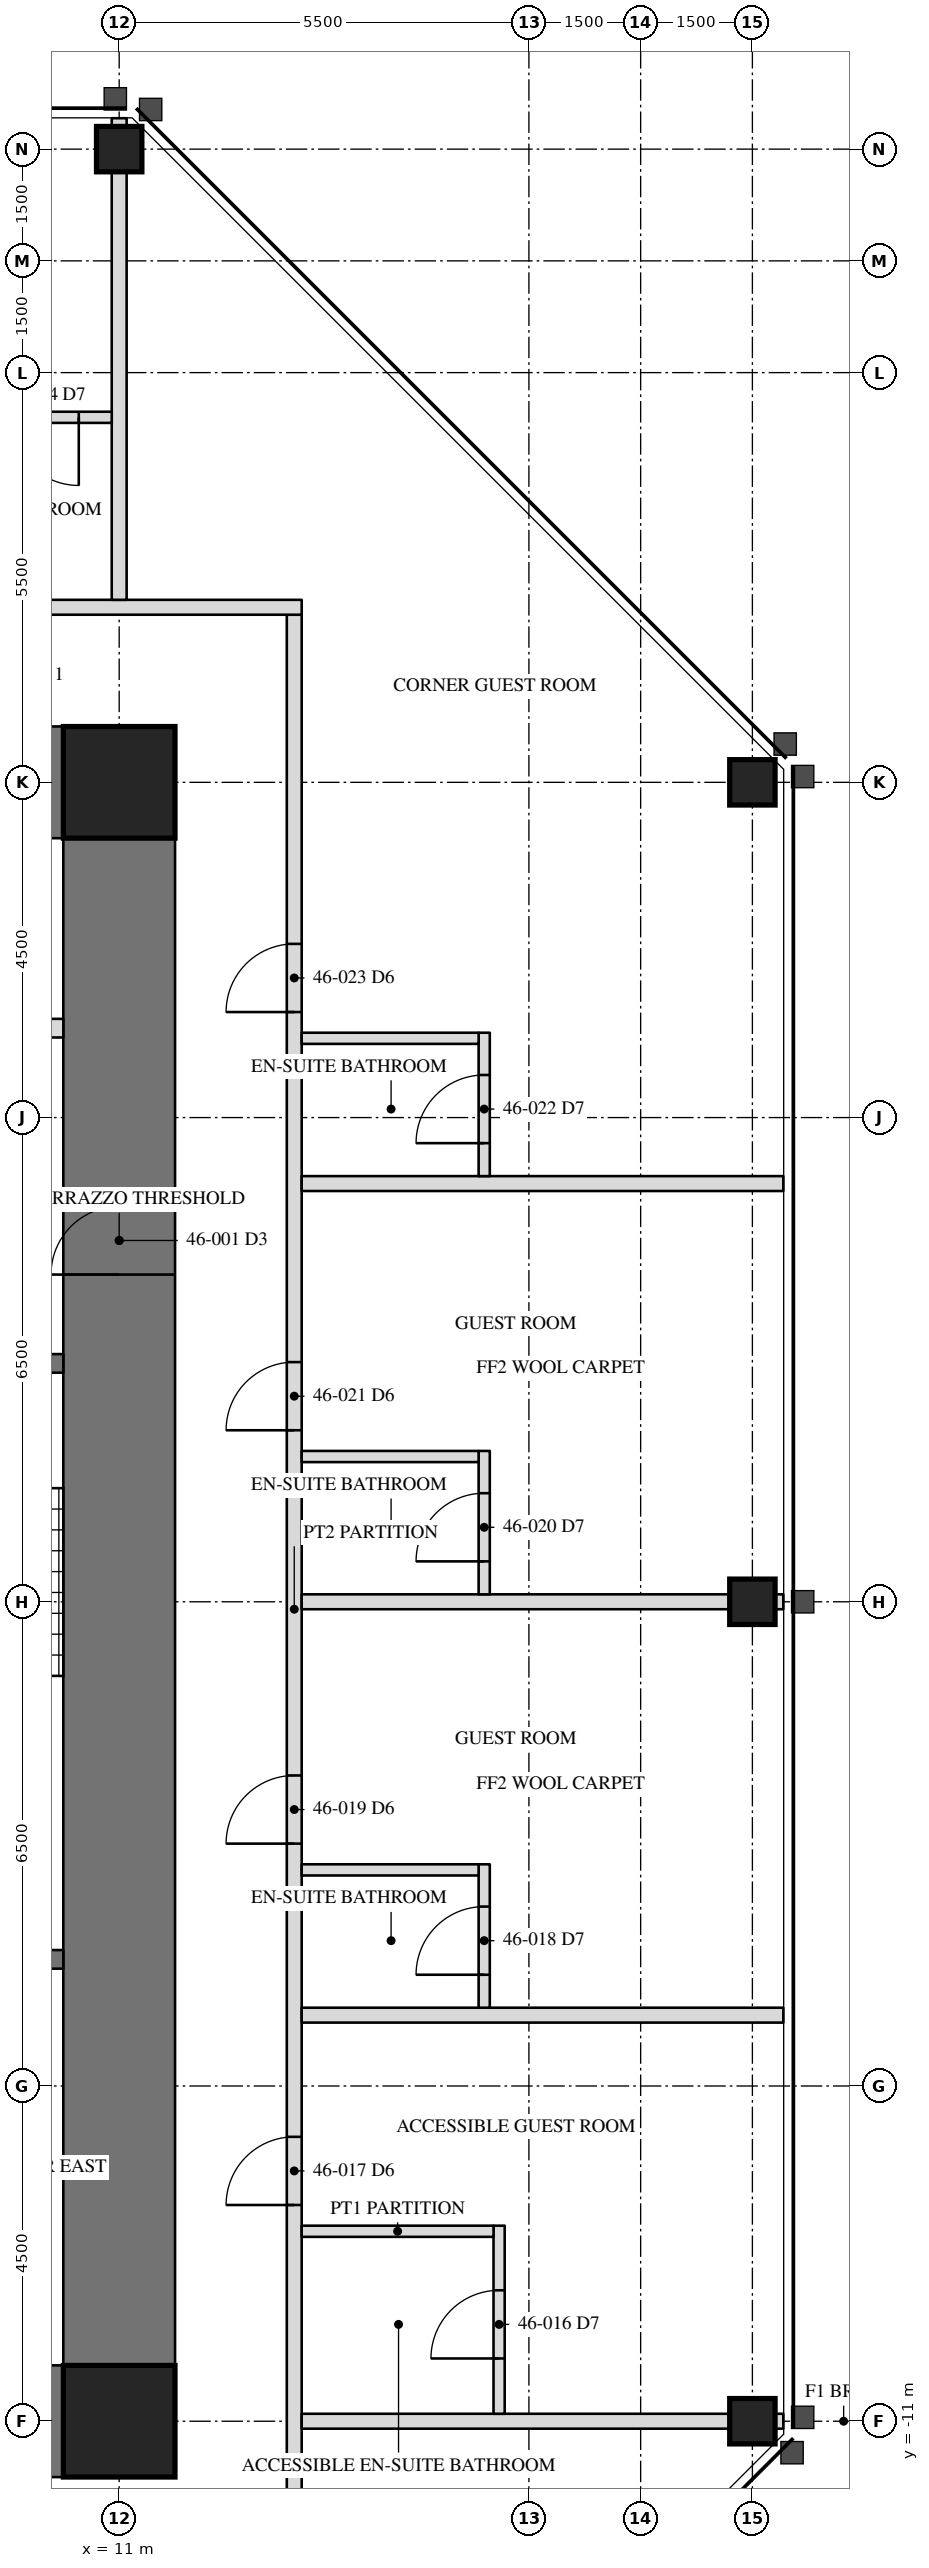
"""IFC4 building model, lengths in metres.
Left out: names, types, materials, properties, quantities, classifications, styles, units other than length and angle.
Written with IfcOpenShell. Run it as: python <this file> out.ifc"""

import sys

from ifc_helpers import new_model, si_unit, direction, frame, frame_2d, origin, origin_2d, place, context, subcontext, project, spatial, rectangle, hollow_rectangle, extrude, element, fill, save


model = new_model("IFC4")
c1 = context("Model", 3, precision=1e-05, world=origin(), true_north=direction((0.0, 1.0)))
c2 = subcontext(c1, "Body", "Model", "MODEL_VIEW")
j1 = project(units=[si_unit("LENGTHUNIT", "METRE"), si_unit("PLANEANGLEUNIT", "RADIAN")], contexts=[c1])
p1 = place(None, origin())
s1 = spatial("IfcSite", under=j1, at=p1, CompositionType="ELEMENT")
p2 = place(p1, origin())
s2 = spatial("IfcBuilding", under=s1, at=p2, CompositionType="ELEMENT")
p3 = place(p2, frame((0.0, 0.0, 197.7)))
s3 = spatial("IfcBuildingStorey", under=s2, at=p3, CompositionType="ELEMENT", Elevation=197.7)
for number, where, z_axis, x_axis in (
    (1, (19.5, -11.0, 0.0), (0.0, 0.0, 1.0), (0.0, 1.0, 0.0)),
    (2, (19.5, 0.0, 0.0), (0.0, 0.0, 1.0), (0.0, 1.0, 0.0)),
    (3, (19.5, 11.0, 0.0), (0.0, 0.0, 1.0), (0.0, 1.0, 0.0)),
    (4, (11.0, 19.5, 0.0), (0.0, 0.0, 1.0), (1.0, 0.0, 0.0)),
):
    element("IfcColumn", number, at=place(p3, frame(where, z_axis=z_axis, x_axis=x_axis)), inside=s3, PredefinedType="COLUMN", context=c2, shape_type="SweptSolid", body=[
        extrude(hollow_rectangle(XDim=0.61, YDim=0.61, WallThickness=0.076, at=origin_2d()), origin(), (0.0, 0.0, 1.0), 3.5),
    ])
p4 = place(p3, frame((11.0, -11.0, 0.0), z_axis=(0.0, 0.0, 1.0), x_axis=(0.0, 1.0, 0.0)))
e5 = element("IfcWall", 5, at=p4, inside=s3, PredefinedType="SHEAR", context=c2, shape_type="SweptSolid", body=[
    extrude(rectangle(XDim=22.0, YDim=1.5, at=frame_2d((11.0, 0.0))), origin(), (0.0, 0.0, 1.0), 3.5),
])
p5 = place(p4, frame((15.393, 0.0, 0.0)))
e6 = element("IfcOpeningElement", 6, at=p5, cuts=e5, PredefinedType="OPENING", context=c2, shape_type="SweptSolid", body=[
    extrude(rectangle(XDim=0.915, YDim=2.134, at=frame_2d((0.458, 1.067))), frame((0.0, 0.76, 0.0), z_axis=(0.0, -1.0, 0.0), x_axis=(1.0, 0.0, 0.0)), (0.0, 0.0, 1.0), 1.52),
])
for number, where, z_axis, x_axis in (
    (7, (11.0, 11.0, 0.0), (0.0, 0.0, 1.0), (-1.0, 0.0, 0.0)),
    (8, (6.5, -11.0, 0.0), (0.0, 0.0, 1.0), (1.0, 0.0, 0.0)),
):
    element("IfcWall", number, at=place(p3, frame(where, z_axis=z_axis, x_axis=x_axis)), inside=s3, PredefinedType="SHEAR", context=c2, shape_type="SweptSolid", body=[
        extrude(rectangle(XDim=4.5, YDim=1.5, at=frame_2d((2.25, 0.0))), origin(), (0.0, 0.0, 1.0), 3.5),
    ])
for number, where, z_axis, x_axis in (
    (9, (11.0, 11.0, 0.0), (0.0, 0.0, 1.0), (1.0, 0.0, 0.0)),
    (10, (11.0, -11.0, 0.0), (0.0, 0.0, 1.0), (1.0, 0.0, 0.0)),
):
    element("IfcColumn", number, at=place(p3, frame(where, z_axis=z_axis, x_axis=x_axis)), inside=s3, PredefinedType="COLUMN", context=c2, shape_type="SweptSolid", body=[
        extrude(hollow_rectangle(XDim=1.499, YDim=1.499, WallThickness=0.102, at=origin_2d()), origin(), (0.0, 0.0, 1.0), 3.5),
    ])
p6 = place(p3, frame((6.95, -4.8, 0.0), z_axis=(0.0, 0.0, 1.0), x_axis=(1.0, 0.0, 0.0)))
e11 = element("IfcWall", 11, at=p6, inside=s3, PredefinedType="SOLIDWALL", context=c2, shape_type="SweptSolid", body=[
    extrude(rectangle(XDim=3.3, YDim=0.25, at=frame_2d((1.65, 0.0))), origin(), (0.0, 0.0, 1.0), 3.31),
])
p7 = place(p3, frame((6.95, 3.2, 0.0), z_axis=(0.0, 0.0, 1.0), x_axis=(1.0, 0.0, 0.0)))
e12 = element("IfcWall", 12, at=p7, inside=s3, PredefinedType="SOLIDWALL", context=c2, shape_type="SweptSolid", body=[
    extrude(rectangle(XDim=3.3, YDim=0.25, at=frame_2d((1.65, 0.0))), origin(), (0.0, 0.0, 1.0), 3.31),
])
p8 = place(p7, frame((1.116, 0.0, 0.0)))
e13 = element("IfcOpeningElement", 13, at=p8, cuts=e12, PredefinedType="OPENING", context=c2, shape_type="SweptSolid", body=[
    extrude(rectangle(XDim=1.067, YDim=2.134, at=frame_2d((0.533, 1.067))), frame((0.0, 0.135, 0.0), z_axis=(0.0, -1.0, 0.0), x_axis=(1.0, 0.0, 0.0)), (0.0, 0.0, 1.0), 0.27),
])
p9 = place(p3, frame((6.95, 7.7, 0.0), z_axis=(0.0, 0.0, 1.0), x_axis=(1.0, 0.0, 0.0)))
e14 = element("IfcWall", 14, at=p9, inside=s3, PredefinedType="PARTITIONING", context=c2, shape_type="SweptSolid", body=[
    extrude(rectangle(XDim=3.3, YDim=0.25, at=frame_2d((1.65, 0.0))), origin(), (0.0, 0.0, 1.0), 3.31),
])
p10 = place(p9, frame((0.45, 0.0, 0.0)))
e15 = element("IfcOpeningElement", 15, at=p10, cuts=e14, PredefinedType="OPENING", context=c2, shape_type="SweptSolid", body=[
    extrude(rectangle(XDim=1.219, YDim=2.134, at=frame_2d((0.609, 1.067))), frame((0.0, 0.135, 0.0), z_axis=(0.0, -1.0, 0.0), x_axis=(1.0, 0.0, 0.0)), (0.0, 0.0, 1.0), 0.27),
])
p11 = place(p3, frame((13.35, -13.45, 0.0), z_axis=(0.0, 0.0, 1.0), x_axis=(0.0, 1.0, 0.0)))
e16 = element("IfcWall", 16, at=p11, inside=s3, PredefinedType="PARTITIONING", context=c2, shape_type="SweptSolid", body=[
    extrude(rectangle(XDim=26.7, YDim=0.2, at=frame_2d((13.35, 0.0))), origin(), (0.0, 0.0, 1.0), 3.31),
])
p12 = place(p11, frame((5.353, 0.0, 0.0)))
e17 = element("IfcOpeningElement", 17, at=p12, cuts=e16, PredefinedType="OPENING", context=c2, shape_type="SweptSolid", body=[
    extrude(rectangle(XDim=0.915, YDim=2.134, at=frame_2d((0.458, 1.067))), frame((0.0, 0.11, 0.0), z_axis=(0.0, -1.0, 0.0), x_axis=(1.0, 0.0, 0.0)), (0.0, 0.0, 1.0), 0.22),
])
p13 = place(p11, frame((10.204, 0.0, 0.0)))
e18 = element("IfcOpeningElement", 18, at=p13, cuts=e16, PredefinedType="OPENING", context=c2, shape_type="SweptSolid", body=[
    extrude(rectangle(XDim=0.915, YDim=2.134, at=frame_2d((0.458, 1.067))), frame((0.0, 0.11, 0.0), z_axis=(0.0, -1.0, 0.0), x_axis=(1.0, 0.0, 0.0)), (0.0, 0.0, 1.0), 0.22),
])
p14 = place(p11, frame((15.752, 0.0, 0.0)))
e19 = element("IfcOpeningElement", 19, at=p14, cuts=e16, PredefinedType="OPENING", context=c2, shape_type="SweptSolid", body=[
    extrude(rectangle(XDim=0.915, YDim=2.134, at=frame_2d((0.458, 1.067))), frame((0.0, 0.11, 0.0), z_axis=(0.0, -1.0, 0.0), x_axis=(1.0, 0.0, 0.0)), (0.0, 0.0, 1.0), 0.22),
])
p15 = place(p11, frame((21.366, 0.0, 0.0)))
e20 = element("IfcOpeningElement", 20, at=p15, cuts=e16, PredefinedType="OPENING", context=c2, shape_type="SweptSolid", body=[
    extrude(rectangle(XDim=0.915, YDim=2.134, at=frame_2d((0.458, 1.067))), frame((0.0, 0.11, 0.0), z_axis=(0.0, -1.0, 0.0), x_axis=(1.0, 0.0, 0.0)), (0.0, 0.0, 1.0), 0.22),
])
p16 = place(p3, frame((13.45, 13.35, 0.0), z_axis=(0.0, 0.0, 1.0), x_axis=(-1.0, 0.0, 0.0)))
e21 = element("IfcWall", 21, at=p16, inside=s3, PredefinedType="PARTITIONING", context=c2, shape_type="SweptSolid", body=[
    extrude(rectangle(XDim=26.7, YDim=0.2, at=frame_2d((13.35, 0.0))), origin(), (0.0, 0.0, 1.0), 3.31),
])
p17 = place(p16, frame((4.752, 0.0, 0.0)))
e22 = element("IfcOpeningElement", 22, at=p17, cuts=e21, PredefinedType="OPENING", context=c2, shape_type="SweptSolid", body=[
    extrude(rectangle(XDim=0.915, YDim=2.134, at=frame_2d((0.458, 1.067))), frame((0.0, 0.11, 0.0), z_axis=(0.0, -1.0, 0.0), x_axis=(1.0, 0.0, 0.0)), (0.0, 0.0, 1.0), 0.22),
])
p18 = place(p16, frame((10.204, 0.0, 0.0)))
e23 = element("IfcOpeningElement", 23, at=p18, cuts=e21, PredefinedType="OPENING", context=c2, shape_type="SweptSolid", body=[
    extrude(rectangle(XDim=0.915, YDim=2.134, at=frame_2d((0.458, 1.067))), frame((0.0, 0.11, 0.0), z_axis=(0.0, -1.0, 0.0), x_axis=(1.0, 0.0, 0.0)), (0.0, 0.0, 1.0), 0.22),
])
p19 = place(p16, frame((15.752, 0.0, 0.0)))
e24 = element("IfcOpeningElement", 24, at=p19, cuts=e21, PredefinedType="OPENING", context=c2, shape_type="SweptSolid", body=[
    extrude(rectangle(XDim=0.915, YDim=2.134, at=frame_2d((0.458, 1.067))), frame((0.0, 0.11, 0.0), z_axis=(0.0, -1.0, 0.0), x_axis=(1.0, 0.0, 0.0)), (0.0, 0.0, 1.0), 0.22),
])
p20 = place(p16, frame((21.366, 0.0, 0.0)))
e25 = element("IfcOpeningElement", 25, at=p20, cuts=e21, PredefinedType="OPENING", context=c2, shape_type="SweptSolid", body=[
    extrude(rectangle(XDim=0.915, YDim=2.134, at=frame_2d((0.458, 1.067))), frame((0.0, 0.11, 0.0), z_axis=(0.0, -1.0, 0.0), x_axis=(1.0, 0.0, 0.0)), (0.0, 0.0, 1.0), 0.22),
])
p21 = place(p3, frame((13.45, -11.0, 0.0), z_axis=(0.0, 0.0, 1.0), x_axis=(1.0, 0.0, 0.0)))
e26 = element("IfcWall", 26, at=p21, inside=s3, PredefinedType="PARTITIONING", context=c2, shape_type="SweptSolid", body=[
    extrude(rectangle(XDim=6.465, YDim=0.2, at=frame_2d((3.232, 0.0))), origin(), (0.0, 0.0, 1.0), 2.802),
])
p22 = place(p3, frame((13.45, -5.549, 0.0), z_axis=(0.0, 0.0, 1.0), x_axis=(1.0, 0.0, 0.0)))
e27 = element("IfcWall", 27, at=p22, inside=s3, PredefinedType="PARTITIONING", context=c2, shape_type="SweptSolid", body=[
    extrude(rectangle(XDim=6.465, YDim=0.2, at=frame_2d((3.232, 0.0))), origin(), (0.0, 0.0, 1.0), 3.31),
])
p23 = place(p3, frame((13.45, 0.0, 0.0), z_axis=(0.0, 0.0, 1.0), x_axis=(1.0, 0.0, 0.0)))
e28 = element("IfcWall", 28, at=p23, inside=s3, PredefinedType="PARTITIONING", context=c2, shape_type="SweptSolid", body=[
    extrude(rectangle(XDim=6.465, YDim=0.2, at=frame_2d((3.232, 0.0))), origin(), (0.0, 0.0, 1.0), 2.802),
])
p24 = place(p3, frame((13.45, 5.614, 0.0), z_axis=(0.0, 0.0, 1.0), x_axis=(1.0, 0.0, 0.0)))
e29 = element("IfcWall", 29, at=p24, inside=s3, PredefinedType="PARTITIONING", context=c2, shape_type="SweptSolid", body=[
    extrude(rectangle(XDim=6.465, YDim=0.2, at=frame_2d((3.232, 0.0))), origin(), (0.0, 0.0, 1.0), 3.31),
])
p25 = place(p3, frame((16.1, -10.9, 0.0), z_axis=(0.0, 0.0, 1.0), x_axis=(0.0, 1.0, 0.0)))
e30 = element("IfcWall", 30, at=p25, inside=s3, PredefinedType="PARTITIONING", context=c2, shape_type="SweptSolid", body=[
    extrude(rectangle(XDim=2.525, YDim=0.15, at=frame_2d((1.262, 0.0))), origin(), (0.0, 0.0, 1.0), 3.31),
])
p26 = place(p25, frame((0.742, 0.0, 0.0)))
e31 = element("IfcOpeningElement", 31, at=p26, cuts=e30, PredefinedType="OPENING", context=c2, shape_type="SweptSolid", body=[
    extrude(rectangle(XDim=0.915, YDim=2.032, at=frame_2d((0.458, 1.016))), frame((0.0, 0.085, 0.0), z_axis=(0.0, -1.0, 0.0), x_axis=(1.0, 0.0, 0.0)), (0.0, 0.0, 1.0), 0.17),
])
p27 = place(p3, frame((13.45, -8.45, 0.0), z_axis=(0.0, 0.0, 1.0), x_axis=(1.0, 0.0, 0.0)))
e32 = element("IfcWall", 32, at=p27, inside=s3, PredefinedType="PARTITIONING", context=c2, shape_type="SweptSolid", body=[
    extrude(rectangle(XDim=2.575, YDim=0.15, at=frame_2d((1.288, 0.0))), origin(), (0.0, 0.0, 1.0), 3.31),
])
p28 = place(p3, frame((15.9, -5.449, 0.0), z_axis=(0.0, 0.0, 1.0), x_axis=(0.0, 1.0, 0.0)))
e33 = element("IfcWall", 33, at=p28, inside=s3, PredefinedType="PARTITIONING", context=c2, shape_type="SweptSolid", body=[
    extrude(rectangle(XDim=1.925, YDim=0.15, at=frame_2d((0.962, 0.0))), origin(), (0.0, 0.0, 1.0), 3.31),
])
p29 = place(p28, frame((0.442, 0.0, 0.0)))
e34 = element("IfcOpeningElement", 34, at=p29, cuts=e33, PredefinedType="OPENING", context=c2, shape_type="SweptSolid", body=[
    extrude(rectangle(XDim=0.915, YDim=2.032, at=frame_2d((0.458, 1.016))), frame((0.0, 0.085, 0.0), z_axis=(0.0, -1.0, 0.0), x_axis=(1.0, 0.0, 0.0)), (0.0, 0.0, 1.0), 0.17),
])
p30 = place(p3, frame((13.45, -3.599, 0.0), z_axis=(0.0, 0.0, 1.0), x_axis=(1.0, 0.0, 0.0)))
e35 = element("IfcWall", 35, at=p30, inside=s3, PredefinedType="PARTITIONING", context=c2, shape_type="SweptSolid", body=[
    extrude(rectangle(XDim=2.375, YDim=0.15, at=frame_2d((1.188, 0.0))), origin(), (0.0, 0.0, 1.0), 2.703),
])
p31 = place(p3, frame((15.9, 0.1, 0.0), z_axis=(0.0, 0.0, 1.0), x_axis=(0.0, 1.0, 0.0)))
e36 = element("IfcWall", 36, at=p31, inside=s3, PredefinedType="PARTITIONING", context=c2, shape_type="SweptSolid", body=[
    extrude(rectangle(XDim=1.925, YDim=0.15, at=frame_2d((0.962, 0.0))), origin(), (0.0, 0.0, 1.0), 3.31),
])
p32 = place(p31, frame((0.442, 0.0, 0.0)))
e37 = element("IfcOpeningElement", 37, at=p32, cuts=e36, PredefinedType="OPENING", context=c2, shape_type="SweptSolid", body=[
    extrude(rectangle(XDim=0.915, YDim=2.032, at=frame_2d((0.458, 1.016))), frame((0.0, 0.085, 0.0), z_axis=(0.0, -1.0, 0.0), x_axis=(1.0, 0.0, 0.0)), (0.0, 0.0, 1.0), 0.17),
])
p33 = place(p3, frame((13.45, 1.95, 0.0), z_axis=(0.0, 0.0, 1.0), x_axis=(1.0, 0.0, 0.0)))
e38 = element("IfcWall", 38, at=p33, inside=s3, PredefinedType="PARTITIONING", context=c2, shape_type="SweptSolid", body=[
    extrude(rectangle(XDim=2.375, YDim=0.15, at=frame_2d((1.188, 0.0))), origin(), (0.0, 0.0, 1.0), 3.31),
])
p34 = place(p3, frame((15.9, 5.714, 0.0), z_axis=(0.0, 0.0, 1.0), x_axis=(0.0, 1.0, 0.0)))
e39 = element("IfcWall", 39, at=p34, inside=s3, PredefinedType="PARTITIONING", context=c2, shape_type="SweptSolid", body=[
    extrude(rectangle(XDim=1.925, YDim=0.15, at=frame_2d((0.962, 0.0))), origin(), (0.0, 0.0, 1.0), 3.31),
])
p35 = place(p34, frame((0.442, 0.0, 0.0)))
e40 = element("IfcOpeningElement", 40, at=p35, cuts=e39, PredefinedType="OPENING", context=c2, shape_type="SweptSolid", body=[
    extrude(rectangle(XDim=0.915, YDim=2.032, at=frame_2d((0.458, 1.016))), frame((0.0, 0.085, 0.0), z_axis=(0.0, -1.0, 0.0), x_axis=(1.0, 0.0, 0.0)), (0.0, 0.0, 1.0), 0.17),
])
p36 = place(p3, frame((13.45, 7.564, 0.0), z_axis=(0.0, 0.0, 1.0), x_axis=(1.0, 0.0, 0.0)))
e41 = element("IfcWall", 41, at=p36, inside=s3, PredefinedType="PARTITIONING", context=c2, shape_type="SweptSolid", body=[
    extrude(rectangle(XDim=2.375, YDim=0.15, at=frame_2d((1.188, 0.0))), origin(), (0.0, 0.0, 1.0), 3.31),
])
p37 = place(p3, frame((11.0, 13.45, 0.0), z_axis=(0.0, 0.0, 1.0), x_axis=(0.0, 1.0, 0.0)))
e42 = element("IfcWall", 42, at=p37, inside=s3, PredefinedType="PARTITIONING", context=c2, shape_type="SweptSolid", body=[
    extrude(rectangle(XDim=6.465, YDim=0.2, at=frame_2d((3.232, 0.0))), origin(), (0.0, 0.0, 1.0), 2.802),
])
p38 = place(p3, frame((10.9, 15.9, 0.0), z_axis=(0.0, 0.0, 1.0), x_axis=(-1.0, 0.0, 0.0)))
e43 = element("IfcWall", 43, at=p38, inside=s3, PredefinedType="PARTITIONING", context=c2, shape_type="SweptSolid", body=[
    extrude(rectangle(XDim=1.925, YDim=0.15, at=frame_2d((0.962, 0.0))), origin(), (0.0, 0.0, 1.0), 3.31),
])
p39 = place(p38, frame((0.442, 0.0, 0.0)))
e44 = element("IfcOpeningElement", 44, at=p39, cuts=e43, PredefinedType="OPENING", context=c2, shape_type="SweptSolid", body=[
    extrude(rectangle(XDim=0.915, YDim=2.032, at=frame_2d((0.458, 1.016))), frame((0.0, 0.085, 0.0), z_axis=(0.0, -1.0, 0.0), x_axis=(1.0, 0.0, 0.0)), (0.0, 0.0, 1.0), 0.17),
])
p40 = place(p5, origin())
e45 = element("IfcDoor", 45, at=p40, inside=s3, OperationType="SINGLE_SWING_RIGHT", PredefinedType="DOOR", context=c2, shape_type="SweptSolid", body=[
    extrude(rectangle(XDim=0.915, YDim=2.134, at=frame_2d((0.458, 1.067))), frame((0.0, -0.675, 0.0), z_axis=(0.0, -1.0, 0.0), x_axis=(1.0, 0.0, 0.0)), (0.0, 0.0, 1.0), 0.05),
])
fill(e6, e45)
p41 = place(p26, origin())
e46 = element("IfcDoor", 46, at=p41, inside=s3, OperationType="SINGLE_SWING_LEFT", PredefinedType="DOOR", context=c2, shape_type="SweptSolid", body=[
    extrude(rectangle(XDim=0.915, YDim=2.032, at=frame_2d((0.458, 1.016))), frame((0.0, 0.025, 0.0), z_axis=(0.0, -1.0, 0.0), x_axis=(1.0, 0.0, 0.0)), (0.0, 0.0, 1.0), 0.05),
])
fill(e31, e46)
p42 = place(p12, origin())
e47 = element("IfcDoor", 47, at=p42, inside=s3, OperationType="SINGLE_SWING_LEFT", PredefinedType="DOOR", context=c2, shape_type="SweptSolid", body=[
    extrude(rectangle(XDim=0.915, YDim=2.134, at=frame_2d((0.458, 1.067))), frame((0.0, 0.025, 0.0), z_axis=(0.0, -1.0, 0.0), x_axis=(1.0, 0.0, 0.0)), (0.0, 0.0, 1.0), 0.05),
])
fill(e17, e47)
p43 = place(p29, origin())
e48 = element("IfcDoor", 48, at=p43, inside=s3, OperationType="SINGLE_SWING_LEFT", PredefinedType="DOOR", context=c2, shape_type="SweptSolid", body=[
    extrude(rectangle(XDim=0.915, YDim=2.032, at=frame_2d((0.458, 1.016))), frame((0.0, 0.025, 0.0), z_axis=(0.0, -1.0, 0.0), x_axis=(1.0, 0.0, 0.0)), (0.0, 0.0, 1.0), 0.05),
])
fill(e34, e48)
p44 = place(p13, origin())
e49 = element("IfcDoor", 49, at=p44, inside=s3, OperationType="SINGLE_SWING_LEFT", PredefinedType="DOOR", context=c2, shape_type="SweptSolid", body=[
    extrude(rectangle(XDim=0.915, YDim=2.134, at=frame_2d((0.458, 1.067))), frame((0.0, 0.025, 0.0), z_axis=(0.0, -1.0, 0.0), x_axis=(1.0, 0.0, 0.0)), (0.0, 0.0, 1.0), 0.05),
])
fill(e18, e49)
p45 = place(p32, origin())
e50 = element("IfcDoor", 50, at=p45, inside=s3, OperationType="SINGLE_SWING_LEFT", PredefinedType="DOOR", context=c2, shape_type="SweptSolid", body=[
    extrude(rectangle(XDim=0.915, YDim=2.032, at=frame_2d((0.458, 1.016))), frame((0.0, 0.025, 0.0), z_axis=(0.0, -1.0, 0.0), x_axis=(1.0, 0.0, 0.0)), (0.0, 0.0, 1.0), 0.05),
])
fill(e37, e50)
p46 = place(p14, origin())
e51 = element("IfcDoor", 51, at=p46, inside=s3, OperationType="SINGLE_SWING_LEFT", PredefinedType="DOOR", context=c2, shape_type="SweptSolid", body=[
    extrude(rectangle(XDim=0.915, YDim=2.134, at=frame_2d((0.458, 1.067))), frame((0.0, 0.025, 0.0), z_axis=(0.0, -1.0, 0.0), x_axis=(1.0, 0.0, 0.0)), (0.0, 0.0, 1.0), 0.05),
])
fill(e19, e51)
p47 = place(p35, origin())
e52 = element("IfcDoor", 52, at=p47, inside=s3, OperationType="SINGLE_SWING_LEFT", PredefinedType="DOOR", context=c2, shape_type="SweptSolid", body=[
    extrude(rectangle(XDim=0.915, YDim=2.032, at=frame_2d((0.458, 1.016))), frame((0.0, 0.025, 0.0), z_axis=(0.0, -1.0, 0.0), x_axis=(1.0, 0.0, 0.0)), (0.0, 0.0, 1.0), 0.05),
])
fill(e40, e52)
p48 = place(p15, origin())
e53 = element("IfcDoor", 53, at=p48, inside=s3, OperationType="SINGLE_SWING_LEFT", PredefinedType="DOOR", context=c2, shape_type="SweptSolid", body=[
    extrude(rectangle(XDim=0.915, YDim=2.134, at=frame_2d((0.458, 1.067))), frame((0.0, 0.025, 0.0), z_axis=(0.0, -1.0, 0.0), x_axis=(1.0, 0.0, 0.0)), (0.0, 0.0, 1.0), 0.05),
])
fill(e20, e53)
p49 = place(p39, origin())
e54 = element("IfcDoor", 54, at=p49, inside=s3, OperationType="SINGLE_SWING_LEFT", PredefinedType="DOOR", context=c2, shape_type="SweptSolid", body=[
    extrude(rectangle(XDim=0.915, YDim=2.032, at=frame_2d((0.458, 1.016))), frame((0.0, 0.025, 0.0), z_axis=(0.0, -1.0, 0.0), x_axis=(1.0, 0.0, 0.0)), (0.0, 0.0, 1.0), 0.05),
])
fill(e44, e54)
save(model, sys.argv[1])
